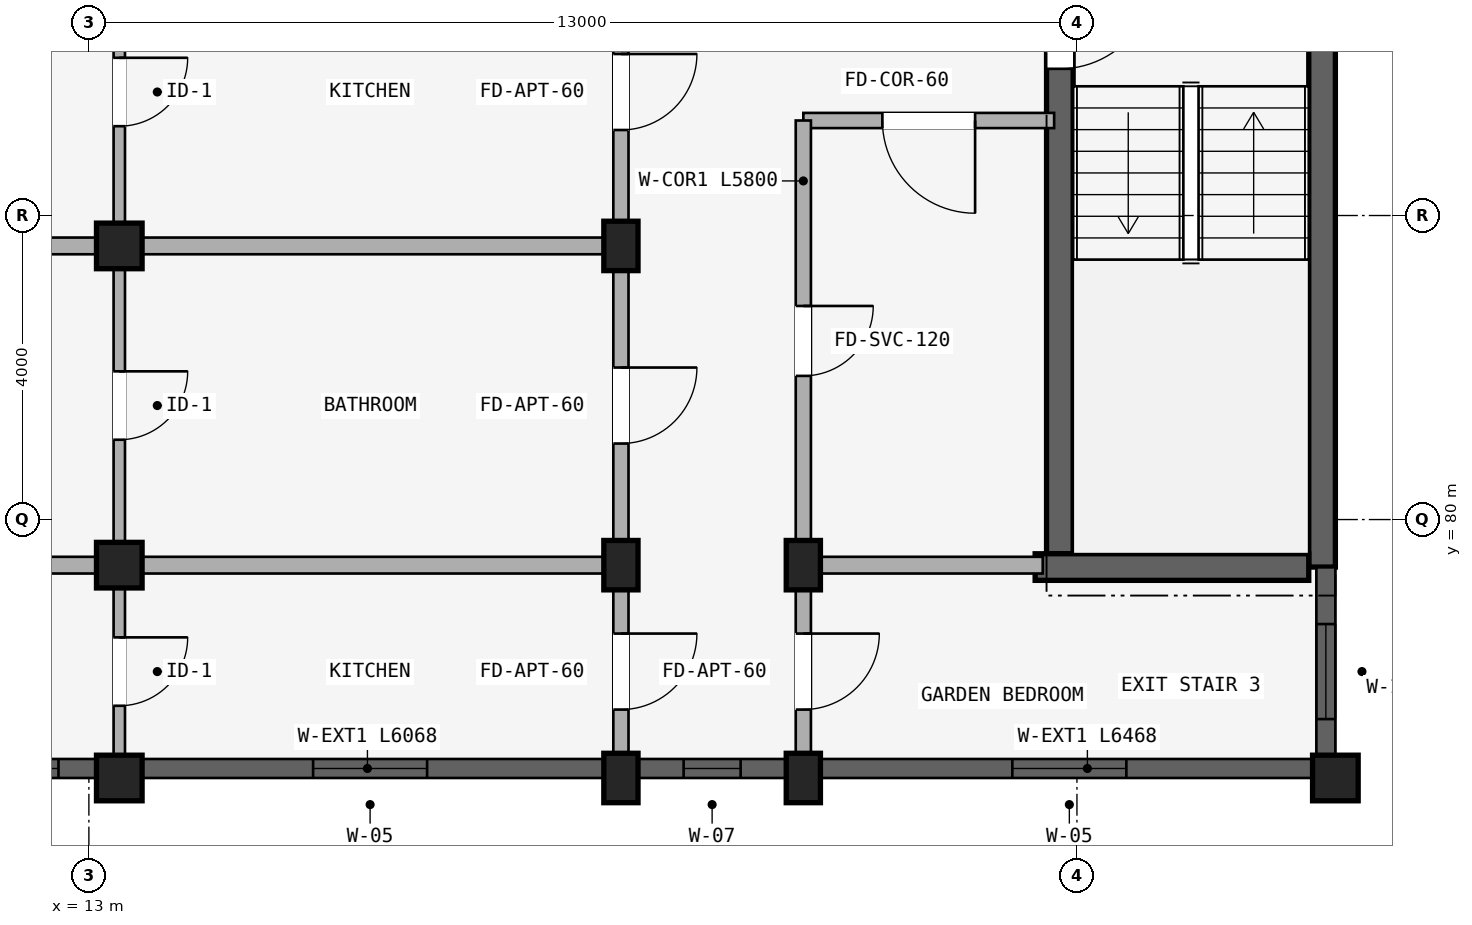
"""IFC4 building model, lengths in metres.
Left out: names, types, materials, properties, quantities, classifications, styles, units other than length and angle.
Written with IfcOpenShell. Run it as: python <this file> out.ifc"""

import sys

from ifc_helpers import new_model, si_unit, direction, frame, frame_2d, origin, origin_2d, place, context, subcontext, project, spatial, rectangle, extrude, element, fill, save


model = new_model("IFC4")
c1 = context("Model", 3, precision=1e-05, world=origin(), true_north=direction((0.0, 1.0)))
c2 = subcontext(c1, "Body", "Model", "MODEL_VIEW")
j1 = project(units=[si_unit("LENGTHUNIT", "METRE"), si_unit("PLANEANGLEUNIT", "RADIAN")], contexts=[c1])
p1 = place(None, origin())
s1 = spatial("IfcSite", under=j1, at=p1, CompositionType="ELEMENT")
p2 = place(p1, origin())
s2 = spatial("IfcBuilding", under=s1, at=p2, CompositionType="ELEMENT")
p3 = place(p2, frame((0.0, 0.0, 37.05)))
s3 = spatial("IfcBuildingStorey", under=s2, at=p3, CompositionType="ELEMENT", Elevation=37.05)
p4 = place(p3, frame((29.225, 87.625, 0.0), z_axis=(0.0, 0.0, 1.0), x_axis=(0.0, -1.0, 0.0)))
e1 = element("IfcWall", 1, at=p4, inside=s3, PredefinedType="SHEAR", context=c2, shape_type="SweptSolid", body=[
    extrude(rectangle(XDim=8.25, YDim=0.35, at=frame_2d((4.125, 0.0))), origin(), (0.0, 0.0, 1.0), 2.93),
])
p5 = place(p3, frame((25.775, 87.45, 0.0), z_axis=(0.0, 0.0, 1.0), x_axis=(0.0, -1.0, 0.0)))
e2 = element("IfcWall", 2, at=p5, inside=s3, PredefinedType="SHEAR", context=c2, shape_type="SweptSolid", body=[
    extrude(rectangle(XDim=7.9, YDim=0.35, at=frame_2d((3.95, 0.0))), origin(), (0.0, 0.0, 1.0), 2.93),
])
p6 = place(p5, frame((0.28, 0.0, 0.0)))
e3 = element("IfcOpeningElement", 3, at=p6, cuts=e2, PredefinedType="OPENING", context=c2, shape_type="SweptSolid", body=[
    extrude(rectangle(XDim=1.24, YDim=2.15, at=frame_2d((0.62, 1.075))), frame((0.0, 0.185, 0.0), z_axis=(0.0, -1.0, 0.0), x_axis=(1.0, 0.0, 0.0)), (0.0, 0.0, 1.0), 0.37),
])
p7 = place(p3, frame((29.05, 79.375, 0.0), z_axis=(0.0, 0.0, 1.0), x_axis=(-1.0, 0.0, 0.0)))
e4 = element("IfcWall", 4, at=p7, inside=s3, PredefinedType="SHEAR", context=c2, shape_type="SweptSolid", body=[
    extrude(rectangle(XDim=3.6, YDim=0.35, at=frame_2d((1.8, 0.0))), origin(), (0.0, 0.0, 1.0), 2.93),
])
p8 = place(p3, frame((20.0, 83.6, 0.0), z_axis=(0.0, 0.0, 1.0), x_axis=(1.0, 0.0, 0.0)))
e5 = element("IfcColumn", 5, at=p8, inside=s3, PredefinedType="COLUMN", context=c2, shape_type="SweptSolid", body=[
    extrude(rectangle(XDim=0.45, YDim=0.65, at=origin_2d()), origin(), (0.0, 0.0, 1.0), 2.93),
])
p9 = place(p3, frame((13.4, 83.6, 0.0), z_axis=(0.0, 0.0, 1.0), x_axis=(1.0, 0.0, 0.0)))
e6 = element("IfcColumn", 6, at=p9, inside=s3, PredefinedType="COLUMN", context=c2, shape_type="SweptSolid", body=[
    extrude(rectangle(XDim=0.6, YDim=0.6, at=origin_2d()), origin(), (0.0, 0.0, 1.0), 2.93),
])
for number, where, z_axis, x_axis in (
    (7, (22.4, 79.4, 0.0), (0.0, 0.0, 1.0), (1.0, 0.0, 0.0)),
    (8, (20.0, 79.4, 0.0), (0.0, 0.0, 1.0), (1.0, 0.0, 0.0)),
):
    element("IfcColumn", number, at=place(p3, frame(where, z_axis=z_axis, x_axis=x_axis)), inside=s3, PredefinedType="COLUMN", context=c2, shape_type="SweptSolid", body=[
        extrude(rectangle(XDim=0.45, YDim=0.65, at=origin_2d()), origin(), (0.0, 0.0, 1.0), 2.93),
    ])
for number, where, z_axis, x_axis in (
    (9, (13.4, 79.4, 0.0), (0.0, 0.0, 1.0), (1.0, 0.0, 0.0)),
    (10, (29.4, 76.6, 0.0), (0.0, 0.0, 1.0), (1.0, 0.0, 0.0)),
):
    element("IfcColumn", number, at=place(p3, frame(where, z_axis=z_axis, x_axis=x_axis)), inside=s3, PredefinedType="COLUMN", context=c2, shape_type="SweptSolid", body=[
        extrude(rectangle(XDim=0.6, YDim=0.6, at=origin_2d()), origin(), (0.0, 0.0, 1.0), 2.93),
    ])
for number, where, z_axis, x_axis in (
    (11, (22.4, 76.6, 0.0), (0.0, 0.0, 1.0), (1.0, 0.0, 0.0)),
    (12, (20.0, 76.6, 0.0), (0.0, 0.0, 1.0), (1.0, 0.0, 0.0)),
):
    element("IfcColumn", number, at=place(p3, frame(where, z_axis=z_axis, x_axis=x_axis)), inside=s3, PredefinedType="COLUMN", context=c2, shape_type="SweptSolid", body=[
        extrude(rectangle(XDim=0.45, YDim=0.65, at=origin_2d()), origin(), (0.0, 0.0, 1.0), 2.93),
    ])
p10 = place(p3, frame((13.4, 76.6, 0.0), z_axis=(0.0, 0.0, 1.0), x_axis=(1.0, 0.0, 0.0)))
e13 = element("IfcColumn", 13, at=p10, inside=s3, PredefinedType="COLUMN", context=c2, shape_type="SweptSolid", body=[
    extrude(rectangle(XDim=0.6, YDim=0.6, at=origin_2d()), origin(), (0.0, 0.0, 1.0), 2.93),
])
p11 = place(p3, frame((25.7, 85.25, 0.0), z_axis=(0.0, 0.0, 1.0), x_axis=(-1.0, 0.0, 0.0)))
e14 = element("IfcWall", 14, at=p11, inside=s3, PredefinedType="STANDARD", context=c2, shape_type="SweptSolid", body=[
    extrude(rectangle(XDim=3.3, YDim=0.2, at=frame_2d((1.65, 0.0))), origin(), (0.0, 0.0, 1.0), 2.372),
])
p12 = place(p11, frame((1.04, 0.0, 0.0)))
e15 = element("IfcOpeningElement", 15, at=p12, cuts=e14, PredefinedType="OPENING", context=c2, shape_type="SweptSolid", body=[
    extrude(rectangle(XDim=1.22, YDim=2.15, at=frame_2d((0.61, 1.075))), frame((0.0, 0.11, 0.0), z_axis=(0.0, -1.0, 0.0), x_axis=(1.0, 0.0, 0.0)), (0.0, 0.0, 1.0), 0.22),
])
p13 = place(p3, frame((22.4, 85.25, 0.0), z_axis=(0.0, 0.0, 1.0), x_axis=(0.0, -1.0, 0.0)))
e16 = element("IfcWall", 16, at=p13, inside=s3, PredefinedType="STANDARD", context=c2, shape_type="SweptSolid", body=[
    extrude(rectangle(XDim=5.8, YDim=0.2, at=frame_2d((2.9, 0.0))), origin(), (0.0, 0.0, 1.0), 2.372),
])
p14 = place(p13, frame((2.44, 0.0, 0.0)))
e17 = element("IfcOpeningElement", 17, at=p14, cuts=e16, PredefinedType="OPENING", context=c2, shape_type="SweptSolid", body=[
    extrude(rectangle(XDim=0.92, YDim=2.1, at=frame_2d((0.46, 1.05))), frame((0.0, 0.11, 0.0), z_axis=(0.0, -1.0, 0.0), x_axis=(1.0, 0.0, 0.0)), (0.0, 0.0, 1.0), 0.22),
])
p15 = place(p3, frame((20.0, 87.65, 0.0), z_axis=(0.0, 0.0, 1.0), x_axis=(0.0, -1.0, 0.0)))
e18 = element("IfcWall", 18, at=p15, inside=s3, PredefinedType="STANDARD", context=c2, shape_type="SweptSolid", body=[
    extrude(rectangle(XDim=4.05, YDim=0.2, at=frame_2d((2.025, 0.0))), origin(), (0.0, 0.0, 1.0), 2.372),
])
p16 = place(p15, frame((1.525, 0.0, 0.0)))
e19 = element("IfcOpeningElement", 19, at=p16, cuts=e18, PredefinedType="OPENING", context=c2, shape_type="SweptSolid", body=[
    extrude(rectangle(XDim=1.0, YDim=2.15, at=frame_2d((0.5, 1.075))), frame((0.0, 0.11, 0.0), z_axis=(0.0, -1.0, 0.0), x_axis=(1.0, 0.0, 0.0)), (0.0, 0.0, 1.0), 0.22),
])
p17 = place(p3, frame((13.4, 87.57, 0.0), z_axis=(0.0, 0.0, 1.0), x_axis=(0.0, -1.0, 0.0)))
e20 = element("IfcWall", 20, at=p17, inside=s3, PredefinedType="PARTITIONING", context=c2, shape_type="SweptSolid", body=[
    extrude(rectangle(XDim=3.89, YDim=0.15, at=frame_2d((1.945, 0.0))), origin(), (0.0, 0.0, 1.0), 2.372),
])
p18 = place(p17, frame((1.495, 0.0, 0.0)))
e21 = element("IfcOpeningElement", 21, at=p18, cuts=e20, PredefinedType="OPENING", context=c2, shape_type="SweptSolid", body=[
    extrude(rectangle(XDim=0.9, YDim=2.1, at=frame_2d((0.45, 1.05))), frame((0.0, 0.085, 0.0), z_axis=(0.0, -1.0, 0.0), x_axis=(1.0, 0.0, 0.0)), (0.0, 0.0, 1.0), 0.17),
])
p19 = place(p3, frame((20.0, 83.6, 0.0), z_axis=(0.0, 0.0, 1.0), x_axis=(0.0, -1.0, 0.0)))
e22 = element("IfcWall", 22, at=p19, inside=s3, PredefinedType="STANDARD", context=c2, shape_type="SweptSolid", body=[
    extrude(rectangle(XDim=4.2, YDim=0.2, at=frame_2d((2.1, 0.0))), origin(), (0.0, 0.0, 1.0), 2.372),
])
p20 = place(p19, frame((1.6, 0.0, 0.0)))
e23 = element("IfcOpeningElement", 23, at=p20, cuts=e22, PredefinedType="OPENING", context=c2, shape_type="SweptSolid", body=[
    extrude(rectangle(XDim=1.0, YDim=2.15, at=frame_2d((0.5, 1.075))), frame((0.0, 0.11, 0.0), z_axis=(0.0, -1.0, 0.0), x_axis=(1.0, 0.0, 0.0)), (0.0, 0.0, 1.0), 0.22),
])
p21 = place(p3, frame((13.4, 83.52, 0.0), z_axis=(0.0, 0.0, 1.0), x_axis=(0.0, -1.0, 0.0)))
e24 = element("IfcWall", 24, at=p21, inside=s3, PredefinedType="PARTITIONING", context=c2, shape_type="SweptSolid", body=[
    extrude(rectangle(XDim=4.04, YDim=0.15, at=frame_2d((2.02, 0.0))), origin(), (0.0, 0.0, 1.0), 2.372),
])
p22 = place(p21, frame((1.57, 0.0, 0.0)))
e25 = element("IfcOpeningElement", 25, at=p22, cuts=e24, PredefinedType="OPENING", context=c2, shape_type="SweptSolid", body=[
    extrude(rectangle(XDim=0.9, YDim=2.1, at=frame_2d((0.45, 1.05))), frame((0.0, 0.085, 0.0), z_axis=(0.0, -1.0, 0.0), x_axis=(1.0, 0.0, 0.0)), (0.0, 0.0, 1.0), 0.17),
])
p23 = place(p3, frame((19.95, 83.6, 0.0), z_axis=(0.0, 0.0, 1.0), x_axis=(-1.0, 0.0, 0.0)))
e26 = element("IfcWall", 26, at=p23, inside=s3, PredefinedType="STANDARD", context=c2, shape_type="SweptSolid", body=[
    extrude(rectangle(XDim=17.53, YDim=0.22, at=frame_2d((8.765, 0.0))), origin(), (0.0, 0.0, 1.0), 2.372),
])
p24 = place(p3, frame((22.4, 79.4, 0.0), z_axis=(0.0, 0.0, 1.0), x_axis=(0.0, -1.0, 0.0)))
e27 = element("IfcWall", 27, at=p24, inside=s3, PredefinedType="STANDARD", context=c2, shape_type="SweptSolid", body=[
    extrude(rectangle(XDim=2.8, YDim=0.2, at=frame_2d((1.4, 0.0))), origin(), (0.0, 0.0, 1.0), 2.372),
])
p25 = place(p24, frame((0.9, 0.0, 0.0)))
e28 = element("IfcOpeningElement", 28, at=p25, cuts=e27, PredefinedType="OPENING", context=c2, shape_type="SweptSolid", body=[
    extrude(rectangle(XDim=1.0, YDim=2.15, at=frame_2d((0.5, 1.075))), frame((0.0, 0.11, 0.0), z_axis=(0.0, -1.0, 0.0), x_axis=(1.0, 0.0, 0.0)), (0.0, 0.0, 1.0), 0.22),
])
p26 = place(p3, frame((20.0, 79.4, 0.0), z_axis=(0.0, 0.0, 1.0), x_axis=(0.0, -1.0, 0.0)))
e29 = element("IfcWall", 29, at=p26, inside=s3, PredefinedType="STANDARD", context=c2, shape_type="SweptSolid", body=[
    extrude(rectangle(XDim=2.8, YDim=0.2, at=frame_2d((1.4, 0.0))), origin(), (0.0, 0.0, 1.0), 2.372),
])
p27 = place(p26, frame((0.9, 0.0, 0.0)))
e30 = element("IfcOpeningElement", 30, at=p27, cuts=e29, PredefinedType="OPENING", context=c2, shape_type="SweptSolid", body=[
    extrude(rectangle(XDim=1.0, YDim=2.15, at=frame_2d((0.5, 1.075))), frame((0.0, 0.11, 0.0), z_axis=(0.0, -1.0, 0.0), x_axis=(1.0, 0.0, 0.0)), (0.0, 0.0, 1.0), 0.22),
])
p28 = place(p3, frame((13.4, 79.32, 0.0), z_axis=(0.0, 0.0, 1.0), x_axis=(0.0, -1.0, 0.0)))
e31 = element("IfcWall", 31, at=p28, inside=s3, PredefinedType="PLUMBINGWALL", context=c2, shape_type="SweptSolid", body=[
    extrude(rectangle(XDim=2.64, YDim=0.15, at=frame_2d((1.32, 0.0))), origin(), (0.0, 0.0, 1.0), 2.372),
])
p29 = place(p28, frame((0.87, 0.0, 0.0)))
e32 = element("IfcOpeningElement", 32, at=p29, cuts=e31, PredefinedType="OPENING", context=c2, shape_type="SweptSolid", body=[
    extrude(rectangle(XDim=0.9, YDim=2.1, at=frame_2d((0.45, 1.05))), frame((0.0, 0.085, 0.0), z_axis=(0.0, -1.0, 0.0), x_axis=(1.0, 0.0, 0.0)), (0.0, 0.0, 1.0), 0.17),
])
p30 = place(p3, frame((25.55, 79.4, 0.0), z_axis=(0.0, 0.0, 1.0), x_axis=(-1.0, 0.0, 0.0)))
e33 = element("IfcWall", 33, at=p30, inside=s3, PredefinedType="STANDARD", context=c2, shape_type="SweptSolid", body=[
    extrude(rectangle(XDim=3.1, YDim=0.22, at=frame_2d((1.55, 0.0))), origin(), (0.0, 0.0, 1.0), 2.372),
])
p31 = place(p3, frame((19.9, 79.4, 0.0), z_axis=(0.0, 0.0, 1.0), x_axis=(-1.0, 0.0, 0.0)))
e34 = element("IfcWall", 34, at=p31, inside=s3, PredefinedType="STANDARD", context=c2, shape_type="SweptSolid", body=[
    extrude(rectangle(XDim=17.42, YDim=0.22, at=frame_2d((8.71, 0.0))), origin(), (0.0, 0.0, 1.0), 2.372),
])
p32 = place(p3, frame((29.275, 79.372, 0.0), z_axis=(0.0, 0.0, 1.0), x_axis=(0.0, -1.0, 0.0)))
e35 = element("IfcWall", 35, at=p32, inside=s3, PredefinedType="STANDARD", context=c2, shape_type="SweptSolid", body=[
    extrude(rectangle(XDim=2.468, YDim=0.25, at=frame_2d((1.234, 0.0))), origin(), (0.0, 0.0, 1.0), 2.472),
])
p33 = place(p32, frame((0.747, 0.0, 0.722)))
e36 = element("IfcOpeningElement", 36, at=p33, cuts=e35, PredefinedType="OPENING", context=c2, shape_type="SweptSolid", body=[
    extrude(rectangle(XDim=1.25, YDim=1.55, at=frame_2d((0.625, 0.775))), frame((0.0, 0.135, 0.0), z_axis=(0.0, -1.0, 0.0), x_axis=(1.0, 0.0, 0.0)), (0.0, 0.0, 1.0), 0.27),
])
p34 = place(p3, frame((29.096, 76.725, 0.0), z_axis=(0.0, 0.0, 1.0), x_axis=(-1.0, 0.0, 0.0)))
e37 = element("IfcWall", 37, at=p34, inside=s3, PredefinedType="STANDARD", context=c2, shape_type="SweptSolid", body=[
    extrude(rectangle(XDim=6.468, YDim=0.25, at=frame_2d((3.234, 0.0))), origin(), (0.0, 0.0, 1.0), 2.372),
])
p35 = place(p34, frame((2.447, 0.0, 0.522)))
e38 = element("IfcOpeningElement", 38, at=p35, cuts=e37, PredefinedType="OPENING", context=c2, shape_type="SweptSolid", body=[
    extrude(rectangle(XDim=1.5, YDim=1.65, at=frame_2d((0.75, 0.825))), frame((0.0, 0.135, 0.0), z_axis=(0.0, -1.0, 0.0), x_axis=(1.0, 0.0, 0.0)), (0.0, 0.0, 1.0), 0.27),
])
p36 = place(p3, frame((22.171, 76.725, 0.0), z_axis=(0.0, 0.0, 1.0), x_axis=(-1.0, 0.0, 0.0)))
e39 = element("IfcWall", 39, at=p36, inside=s3, PredefinedType="STANDARD", context=c2, shape_type="SweptSolid", body=[
    extrude(rectangle(XDim=1.943, YDim=0.25, at=frame_2d((0.971, 0.0))), origin(), (0.0, 0.0, 1.0), 2.372),
])
p37 = place(p36, frame((0.596, 0.0, 0.88)))
e40 = element("IfcOpeningElement", 40, at=p37, cuts=e39, PredefinedType="OPENING", context=c2, shape_type="SweptSolid", body=[
    extrude(rectangle(XDim=0.75, YDim=1.05, at=frame_2d((0.375, 0.525))), frame((0.0, 0.135, 0.0), z_axis=(0.0, -1.0, 0.0), x_axis=(1.0, 0.0, 0.0)), (0.0, 0.0, 1.0), 0.27),
])
p38 = place(p3, frame((19.771, 76.725, 0.0), z_axis=(0.0, 0.0, 1.0), x_axis=(-1.0, 0.0, 0.0)))
e41 = element("IfcWall", 41, at=p38, inside=s3, PredefinedType="STANDARD", context=c2, shape_type="SweptSolid", body=[
    extrude(rectangle(XDim=6.068, YDim=0.25, at=frame_2d((3.034, 0.0))), origin(), (0.0, 0.0, 1.0), 2.372),
])
p39 = place(p38, frame((2.322, 0.0, 0.522)))
e42 = element("IfcOpeningElement", 42, at=p39, cuts=e41, PredefinedType="OPENING", context=c2, shape_type="SweptSolid", body=[
    extrude(rectangle(XDim=1.5, YDim=1.65, at=frame_2d((0.75, 0.825))), frame((0.0, 0.135, 0.0), z_axis=(0.0, -1.0, 0.0), x_axis=(1.0, 0.0, 0.0)), (0.0, 0.0, 1.0), 0.27),
])
p40 = place(p3, frame((13.096, 76.725, 0.0), z_axis=(0.0, 0.0, 1.0), x_axis=(-1.0, 0.0, 0.0)))
e43 = element("IfcWall", 43, at=p40, inside=s3, PredefinedType="STANDARD", context=c2, shape_type="SweptSolid", body=[
    extrude(rectangle(XDim=2.193, YDim=0.25, at=frame_2d((1.096, 0.0))), origin(), (0.0, 0.0, 1.0), 2.372),
])
p41 = place(p40, frame((0.497, 0.0, 0.672)))
e44 = element("IfcOpeningElement", 44, at=p41, cuts=e43, PredefinedType="OPENING", context=c2, shape_type="SweptSolid", body=[
    extrude(rectangle(XDim=1.2, YDim=1.5, at=frame_2d((0.6, 0.75))), frame((0.0, 0.135, 0.0), z_axis=(0.0, -1.0, 0.0), x_axis=(1.0, 0.0, 0.0)), (0.0, 0.0, 1.0), 0.27),
])
p42 = place(p33, origin())
e45 = element("IfcWindow", 45, at=p42, inside=s3, PartitioningType="SINGLE_PANEL", PredefinedType="WINDOW", context=c2, shape_type="SweptSolid", body=[
    extrude(rectangle(XDim=1.25, YDim=1.55, at=frame_2d((0.625, 0.775))), frame((0.0, 0.03, 0.0), z_axis=(0.0, -1.0, 0.0), x_axis=(1.0, 0.0, 0.0)), (0.0, 0.0, 1.0), 0.06),
])
fill(e36, e45)
p43 = place(p35, origin())
e46 = element("IfcWindow", 46, at=p43, inside=s3, PartitioningType="DOUBLE_PANEL_VERTICAL", PredefinedType="WINDOW", context=c2, shape_type="SweptSolid", body=[
    extrude(rectangle(XDim=1.5, YDim=1.65, at=frame_2d((0.75, 0.825))), frame((0.0, 0.03, 0.0), z_axis=(0.0, -1.0, 0.0), x_axis=(1.0, 0.0, 0.0)), (0.0, 0.0, 1.0), 0.06),
])
fill(e38, e46)
p44 = place(p37, origin())
e47 = element("IfcWindow", 47, at=p44, inside=s3, PartitioningType="SINGLE_PANEL", PredefinedType="WINDOW", context=c2, shape_type="SweptSolid", body=[
    extrude(rectangle(XDim=0.75, YDim=1.05, at=frame_2d((0.375, 0.525))), frame((0.0, 0.03, 0.0), z_axis=(0.0, -1.0, 0.0), x_axis=(1.0, 0.0, 0.0)), (0.0, 0.0, 1.0), 0.06),
])
fill(e40, e47)
p45 = place(p39, origin())
e48 = element("IfcWindow", 48, at=p45, inside=s3, PartitioningType="DOUBLE_PANEL_VERTICAL", PredefinedType="WINDOW", context=c2, shape_type="SweptSolid", body=[
    extrude(rectangle(XDim=1.5, YDim=1.65, at=frame_2d((0.75, 0.825))), frame((0.0, 0.03, 0.0), z_axis=(0.0, -1.0, 0.0), x_axis=(1.0, 0.0, 0.0)), (0.0, 0.0, 1.0), 0.06),
])
fill(e42, e48)
p46 = place(p41, origin())
e49 = element("IfcWindow", 49, at=p46, inside=s3, PartitioningType="SINGLE_PANEL", PredefinedType="WINDOW", context=c2, shape_type="SweptSolid", body=[
    extrude(rectangle(XDim=1.2, YDim=1.5, at=frame_2d((0.6, 0.75))), frame((0.0, 0.03, 0.0), z_axis=(0.0, -1.0, 0.0), x_axis=(1.0, 0.0, 0.0)), (0.0, 0.0, 1.0), 0.06),
])
fill(e44, e49)
p47 = place(p6, origin())
e50 = element("IfcDoor", 50, at=p47, inside=s3, OperationType="SINGLE_SWING_LEFT", PredefinedType="DOOR", context=c2, shape_type="SweptSolid", body=[
    extrude(rectangle(XDim=1.24, YDim=2.15, at=frame_2d((0.62, 1.075))), frame((0.0, 0.025, 0.0), z_axis=(0.0, -1.0, 0.0), x_axis=(1.0, 0.0, 0.0)), (0.0, 0.0, 1.0), 0.05),
])
fill(e3, e50)
p48 = place(p12, origin())
e51 = element("IfcDoor", 51, at=p48, inside=s3, OperationType="SINGLE_SWING_LEFT", PredefinedType="DOOR", context=c2, shape_type="SweptSolid", body=[
    extrude(rectangle(XDim=1.22, YDim=2.15, at=frame_2d((0.61, 1.075))), frame((0.0, 0.025, 0.0), z_axis=(0.0, -1.0, 0.0), x_axis=(1.0, 0.0, 0.0)), (0.0, 0.0, 1.0), 0.05),
])
fill(e15, e51)
p49 = place(p14, frame((0.92, 0.0, 0.0), z_axis=(0.0, 0.0, 1.0), x_axis=(-1.0, 0.0, 0.0)))
e52 = element("IfcDoor", 52, at=p49, inside=s3, OperationType="SINGLE_SWING_RIGHT", PredefinedType="DOOR", context=c2, shape_type="SweptSolid", body=[
    extrude(rectangle(XDim=0.92, YDim=2.1, at=frame_2d((0.46, 1.05))), frame((0.0, 0.025, 0.0), z_axis=(0.0, -1.0, 0.0), x_axis=(1.0, 0.0, 0.0)), (0.0, 0.0, 1.0), 0.05),
])
fill(e17, e52)
p50 = place(p16, origin())
e53 = element("IfcDoor", 53, at=p50, inside=s3, OperationType="SINGLE_SWING_LEFT", PredefinedType="DOOR", context=c2, shape_type="SweptSolid", body=[
    extrude(rectangle(XDim=1.0, YDim=2.15, at=frame_2d((0.5, 1.075))), frame((0.0, 0.025, 0.0), z_axis=(0.0, -1.0, 0.0), x_axis=(1.0, 0.0, 0.0)), (0.0, 0.0, 1.0), 0.05),
])
fill(e19, e53)
p51 = place(p18, frame((0.9, 0.0, 0.0), z_axis=(0.0, 0.0, 1.0), x_axis=(-1.0, 0.0, 0.0)))
e54 = element("IfcDoor", 54, at=p51, inside=s3, OperationType="SINGLE_SWING_RIGHT", PredefinedType="DOOR", context=c2, shape_type="SweptSolid", body=[
    extrude(rectangle(XDim=0.9, YDim=2.1, at=frame_2d((0.45, 1.05))), frame((0.0, 0.025, 0.0), z_axis=(0.0, -1.0, 0.0), x_axis=(1.0, 0.0, 0.0)), (0.0, 0.0, 1.0), 0.05),
])
fill(e21, e54)
p52 = place(p20, origin())
e55 = element("IfcDoor", 55, at=p52, inside=s3, OperationType="SINGLE_SWING_LEFT", PredefinedType="DOOR", context=c2, shape_type="SweptSolid", body=[
    extrude(rectangle(XDim=1.0, YDim=2.15, at=frame_2d((0.5, 1.075))), frame((0.0, 0.025, 0.0), z_axis=(0.0, -1.0, 0.0), x_axis=(1.0, 0.0, 0.0)), (0.0, 0.0, 1.0), 0.05),
])
fill(e23, e55)
p53 = place(p22, frame((0.9, 0.0, 0.0), z_axis=(0.0, 0.0, 1.0), x_axis=(-1.0, 0.0, 0.0)))
e56 = element("IfcDoor", 56, at=p53, inside=s3, OperationType="SINGLE_SWING_RIGHT", PredefinedType="DOOR", context=c2, shape_type="SweptSolid", body=[
    extrude(rectangle(XDim=0.9, YDim=2.1, at=frame_2d((0.45, 1.05))), frame((0.0, 0.025, 0.0), z_axis=(0.0, -1.0, 0.0), x_axis=(1.0, 0.0, 0.0)), (0.0, 0.0, 1.0), 0.05),
])
fill(e25, e56)
p54 = place(p25, origin())
e57 = element("IfcDoor", 57, at=p54, inside=s3, OperationType="SINGLE_SWING_LEFT", PredefinedType="DOOR", context=c2, shape_type="SweptSolid", body=[
    extrude(rectangle(XDim=1.0, YDim=2.15, at=frame_2d((0.5, 1.075))), frame((0.0, 0.025, 0.0), z_axis=(0.0, -1.0, 0.0), x_axis=(1.0, 0.0, 0.0)), (0.0, 0.0, 1.0), 0.05),
])
fill(e28, e57)
p55 = place(p29, frame((0.9, 0.0, 0.0), z_axis=(0.0, 0.0, 1.0), x_axis=(-1.0, 0.0, 0.0)))
e58 = element("IfcDoor", 58, at=p55, inside=s3, OperationType="SINGLE_SWING_RIGHT", PredefinedType="DOOR", context=c2, shape_type="SweptSolid", body=[
    extrude(rectangle(XDim=0.9, YDim=2.1, at=frame_2d((0.45, 1.05))), frame((0.0, 0.025, 0.0), z_axis=(0.0, -1.0, 0.0), x_axis=(1.0, 0.0, 0.0)), (0.0, 0.0, 1.0), 0.05),
])
fill(e32, e58)
p56 = place(p27, origin())
e59 = element("IfcDoor", 59, at=p56, inside=s3, OperationType="SINGLE_SWING_LEFT", PredefinedType="DOOR", context=c2, shape_type="SweptSolid", body=[
    extrude(rectangle(XDim=1.0, YDim=2.15, at=frame_2d((0.5, 1.075))), frame((0.0, 0.025, 0.0), z_axis=(0.0, -1.0, 0.0), x_axis=(1.0, 0.0, 0.0)), (0.0, 0.0, 1.0), 0.05),
])
fill(e30, e59)
save(model, sys.argv[1])
